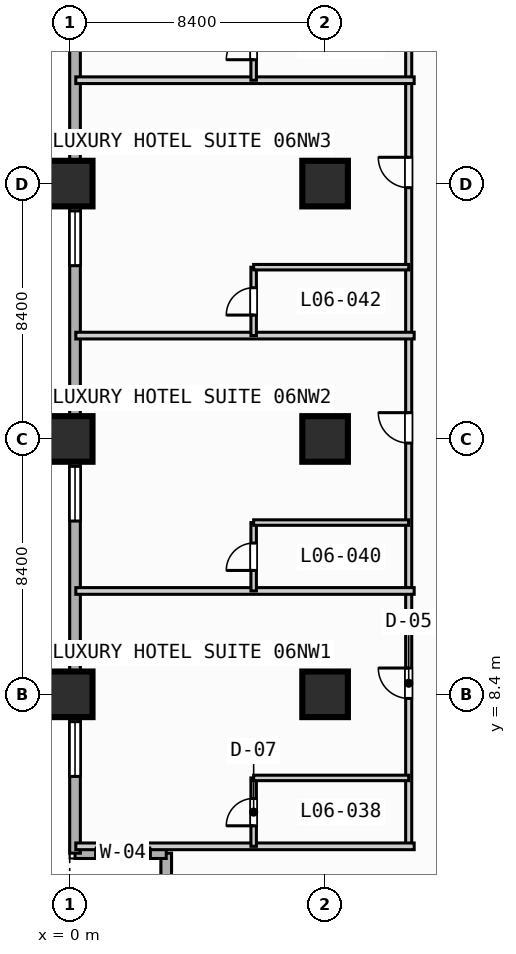
"""IFC4 building model, lengths in metres.
Left out: names, types, materials, properties, quantities, classifications, styles, units other than length and angle.
Written with IfcOpenShell. Run it as: python <this file> out.ifc"""

import sys

from ifc_helpers import new_model, si_unit, direction, frame, frame_2d, origin, origin_2d, place, context, subcontext, project, spatial, rectangle, extrude, element, fill, save


model = new_model("IFC4")
c1 = context("Model", 3, precision=1e-05, world=origin(), true_north=direction((0.0, 1.0)))
c2 = subcontext(c1, "Body", "Model", "MODEL_VIEW")
j1 = project(units=[si_unit("LENGTHUNIT", "METRE"), si_unit("PLANEANGLEUNIT", "RADIAN")], contexts=[c1])
p1 = place(None, origin())
s1 = spatial("IfcSite", under=j1, at=p1, CompositionType="ELEMENT")
p2 = place(p1, origin())
s2 = spatial("IfcBuilding", under=s1, at=p2, CompositionType="ELEMENT")
p3 = place(p2, frame((0.0, 0.0, 32.0)))
s3 = spatial("IfcBuildingStorey", under=s2, at=p3, CompositionType="ELEMENT", Elevation=32.0)
for number, where, z_axis, x_axis in (
    (1, (0.0, 8.4, 0.0), (0.0, 0.0, 1.0), (1.0, 0.0, 0.0)),
    (2, (0.0, 16.8, 0.0), (0.0, 0.0, 1.0), (1.0, 0.0, 0.0)),
    (3, (0.0, 25.2, 0.0), (0.0, 0.0, 1.0), (1.0, 0.0, 0.0)),
    (4, (8.4, 8.4, 0.0), (0.0, 0.0, 1.0), (1.0, 0.0, 0.0)),
    (5, (8.4, 16.8, 0.0), (0.0, 0.0, 1.0), (1.0, 0.0, 0.0)),
    (6, (8.4, 25.2, 0.0), (0.0, 0.0, 1.0), (1.0, 0.0, 0.0)),
):
    element("IfcColumn", number, at=place(p3, frame(where, z_axis=z_axis, x_axis=x_axis)), inside=s3, PredefinedType="COLUMN", context=c2, shape_type="SweptSolid", body=[
        extrude(rectangle(XDim=1.5, YDim=1.5, at=origin_2d()), origin(), (0.0, 0.0, 1.0), 3.8),
    ])
p4 = place(p3, frame((3.175, 0.175, 0.0), z_axis=(0.0, 0.0, 1.0), x_axis=(0.0, 1.0, 0.0)))
e7 = element("IfcWall", 7, at=p4, inside=s3, PredefinedType="STANDARD", context=c2, shape_type="SweptSolid", body=[
    extrude(rectangle(XDim=3.0, YDim=0.35, at=frame_2d((1.5, 0.0))), origin(), (0.0, 0.0, 1.0), 3.55),
])
p5 = place(p3, frame((3.175, 3.175, 0.0), z_axis=(0.0, 0.0, 1.0), x_axis=(-1.0, 0.0, 0.0)))
e8 = element("IfcWall", 8, at=p5, inside=s3, PredefinedType="STANDARD", context=c2, shape_type="SweptSolid", body=[
    extrude(rectangle(XDim=3.0, YDim=0.35, at=frame_2d((1.5, 0.0))), origin(), (0.0, 0.0, 1.0), 3.55),
])
p6 = place(p5, frame((0.522, 0.0, 0.85)))
e9 = element("IfcOpeningElement", 9, at=p6, cuts=e8, PredefinedType="OPENING", context=c2, shape_type="SweptSolid", body=[
    extrude(rectangle(XDim=1.8, YDim=1.8, at=frame_2d((0.9, 0.9))), frame((0.0, 0.185, 0.0), z_axis=(0.0, -1.0, 0.0), x_axis=(1.0, 0.0, 0.0)), (0.0, 0.0, 1.0), 0.37),
])
p7 = place(p3, frame((0.175, 3.175, 0.0), z_axis=(0.0, 0.0, 1.0), x_axis=(0.0, 1.0, 0.0)))
e10 = element("IfcWall", 10, at=p7, inside=s3, PredefinedType="STANDARD", context=c2, shape_type="SweptSolid", body=[
    extrude(rectangle(XDim=86.05, YDim=0.35, at=frame_2d((43.025, 0.0))), origin(), (0.0, 0.0, 1.0), 3.55),
])
p8 = place(p7, frame((42.825, 0.0, 0.0)))
e11 = element("IfcOpeningElement", 11, at=p8, cuts=e10, PredefinedType="OPENING", context=c2, shape_type="SweptSolid", body=[
    extrude(rectangle(XDim=1.4, YDim=2.2, at=frame_2d((0.7, 1.1))), frame((0.0, 0.185, 0.0), z_axis=(0.0, -1.0, 0.0), x_axis=(1.0, 0.0, 0.0)), (0.0, 0.0, 1.0), 0.37),
])
p9 = place(p7, frame((2.525, 0.0, 0.85)))
e12 = element("IfcOpeningElement", 12, at=p9, cuts=e10, PredefinedType="OPENING", context=c2, shape_type="SweptSolid", body=[
    extrude(rectangle(XDim=1.8, YDim=1.8, at=frame_2d((0.9, 0.9))), frame((0.0, 0.185, 0.0), z_axis=(0.0, -1.0, 0.0), x_axis=(1.0, 0.0, 0.0)), (0.0, 0.0, 1.0), 0.37),
])
p10 = place(p7, frame((10.925, 0.0, 0.85)))
e13 = element("IfcOpeningElement", 13, at=p10, cuts=e10, PredefinedType="OPENING", context=c2, shape_type="SweptSolid", body=[
    extrude(rectangle(XDim=1.8, YDim=1.8, at=frame_2d((0.9, 0.9))), frame((0.0, 0.185, 0.0), z_axis=(0.0, -1.0, 0.0), x_axis=(1.0, 0.0, 0.0)), (0.0, 0.0, 1.0), 0.37),
])
p11 = place(p7, frame((19.325, 0.0, 0.85)))
e14 = element("IfcOpeningElement", 14, at=p11, cuts=e10, PredefinedType="OPENING", context=c2, shape_type="SweptSolid", body=[
    extrude(rectangle(XDim=1.8, YDim=1.8, at=frame_2d((0.9, 0.9))), frame((0.0, 0.185, 0.0), z_axis=(0.0, -1.0, 0.0), x_axis=(1.0, 0.0, 0.0)), (0.0, 0.0, 1.0), 0.37),
])
p12 = place(p7, frame((27.725, 0.0, 0.85)))
e15 = element("IfcOpeningElement", 15, at=p12, cuts=e10, PredefinedType="OPENING", context=c2, shape_type="SweptSolid", body=[
    extrude(rectangle(XDim=1.8, YDim=1.8, at=frame_2d((0.9, 0.9))), frame((0.0, 0.185, 0.0), z_axis=(0.0, -1.0, 0.0), x_axis=(1.0, 0.0, 0.0)), (0.0, 0.0, 1.0), 0.37),
])
p13 = place(p7, frame((36.125, 0.0, 0.85)))
e16 = element("IfcOpeningElement", 16, at=p13, cuts=e10, PredefinedType="OPENING", context=c2, shape_type="SweptSolid", body=[
    extrude(rectangle(XDim=1.8, YDim=1.8, at=frame_2d((0.9, 0.9))), frame((0.0, 0.185, 0.0), z_axis=(0.0, -1.0, 0.0), x_axis=(1.0, 0.0, 0.0)), (0.0, 0.0, 1.0), 0.37),
])
p14 = place(p7, frame((52.925, 0.0, 0.85)))
e17 = element("IfcOpeningElement", 17, at=p14, cuts=e10, PredefinedType="OPENING", context=c2, shape_type="SweptSolid", body=[
    extrude(rectangle(XDim=1.8, YDim=1.8, at=frame_2d((0.9, 0.9))), frame((0.0, 0.185, 0.0), z_axis=(0.0, -1.0, 0.0), x_axis=(1.0, 0.0, 0.0)), (0.0, 0.0, 1.0), 0.37),
])
p15 = place(p7, frame((61.325, 0.0, 0.85)))
e18 = element("IfcOpeningElement", 18, at=p15, cuts=e10, PredefinedType="OPENING", context=c2, shape_type="SweptSolid", body=[
    extrude(rectangle(XDim=1.8, YDim=1.8, at=frame_2d((0.9, 0.9))), frame((0.0, 0.185, 0.0), z_axis=(0.0, -1.0, 0.0), x_axis=(1.0, 0.0, 0.0)), (0.0, 0.0, 1.0), 0.37),
])
p16 = place(p7, frame((69.725, 0.0, 0.85)))
e19 = element("IfcOpeningElement", 19, at=p16, cuts=e10, PredefinedType="OPENING", context=c2, shape_type="SweptSolid", body=[
    extrude(rectangle(XDim=1.8, YDim=1.8, at=frame_2d((0.9, 0.9))), frame((0.0, 0.185, 0.0), z_axis=(0.0, -1.0, 0.0), x_axis=(1.0, 0.0, 0.0)), (0.0, 0.0, 1.0), 0.37),
])
p17 = place(p7, frame((78.075, 0.0, 0.85)))
e20 = element("IfcOpeningElement", 20, at=p17, cuts=e10, PredefinedType="OPENING", context=c2, shape_type="SweptSolid", body=[
    extrude(rectangle(XDim=1.8, YDim=1.8, at=frame_2d((0.9, 0.9))), frame((0.0, 0.185, 0.0), z_axis=(0.0, -1.0, 0.0), x_axis=(1.0, 0.0, 0.0)), (0.0, 0.0, 1.0), 0.37),
])
p18 = place(p3, frame((11.15, 3.4, 0.0), z_axis=(0.0, 0.0, 1.0), x_axis=(0.0, 1.0, 0.0)))
e21 = element("IfcWall", 21, at=p18, inside=s3, PredefinedType="PARTITIONING", context=c2, shape_type="SweptSolid", body=[
    extrude(rectangle(XDim=85.4, YDim=0.2, at=frame_2d((42.7, 0.0))), origin(), (0.0, 0.0, 1.0), 3.55),
])
p19 = place(p18, frame((4.865, 0.0, 0.0)))
e22 = element("IfcOpeningElement", 22, at=p19, cuts=e21, PredefinedType="OPENING", context=c2, shape_type="SweptSolid", body=[
    extrude(rectangle(XDim=1.0, YDim=2.15, at=frame_2d((0.5, 1.075))), frame((0.0, 0.11, 0.0), z_axis=(0.0, -1.0, 0.0), x_axis=(1.0, 0.0, 0.0)), (0.0, 0.0, 1.0), 0.22),
])
p20 = place(p18, frame((13.265, 0.0, 0.0)))
e23 = element("IfcOpeningElement", 23, at=p20, cuts=e21, PredefinedType="OPENING", context=c2, shape_type="SweptSolid", body=[
    extrude(rectangle(XDim=1.0, YDim=2.15, at=frame_2d((0.5, 1.075))), frame((0.0, 0.11, 0.0), z_axis=(0.0, -1.0, 0.0), x_axis=(1.0, 0.0, 0.0)), (0.0, 0.0, 1.0), 0.22),
])
p21 = place(p18, frame((21.665, 0.0, 0.0)))
e24 = element("IfcOpeningElement", 24, at=p21, cuts=e21, PredefinedType="OPENING", context=c2, shape_type="SweptSolid", body=[
    extrude(rectangle(XDim=1.0, YDim=2.15, at=frame_2d((0.5, 1.075))), frame((0.0, 0.11, 0.0), z_axis=(0.0, -1.0, 0.0), x_axis=(1.0, 0.0, 0.0)), (0.0, 0.0, 1.0), 0.22),
])
p22 = place(p18, frame((30.065, 0.0, 0.0)))
e25 = element("IfcOpeningElement", 25, at=p22, cuts=e21, PredefinedType="OPENING", context=c2, shape_type="SweptSolid", body=[
    extrude(rectangle(XDim=1.0, YDim=2.15, at=frame_2d((0.5, 1.075))), frame((0.0, 0.11, 0.0), z_axis=(0.0, -1.0, 0.0), x_axis=(1.0, 0.0, 0.0)), (0.0, 0.0, 1.0), 0.22),
])
p23 = place(p18, frame((38.465, 0.0, 0.0)))
e26 = element("IfcOpeningElement", 26, at=p23, cuts=e21, PredefinedType="OPENING", context=c2, shape_type="SweptSolid", body=[
    extrude(rectangle(XDim=1.0, YDim=2.15, at=frame_2d((0.5, 1.075))), frame((0.0, 0.11, 0.0), z_axis=(0.0, -1.0, 0.0), x_axis=(1.0, 0.0, 0.0)), (0.0, 0.0, 1.0), 0.22),
])
p24 = place(p18, frame((46.865, 0.0, 0.0)))
e27 = element("IfcOpeningElement", 27, at=p24, cuts=e21, PredefinedType="OPENING", context=c2, shape_type="SweptSolid", body=[
    extrude(rectangle(XDim=1.0, YDim=2.15, at=frame_2d((0.5, 1.075))), frame((0.0, 0.11, 0.0), z_axis=(0.0, -1.0, 0.0), x_axis=(1.0, 0.0, 0.0)), (0.0, 0.0, 1.0), 0.22),
])
p25 = place(p18, frame((55.265, 0.0, 0.0)))
e28 = element("IfcOpeningElement", 28, at=p25, cuts=e21, PredefinedType="OPENING", context=c2, shape_type="SweptSolid", body=[
    extrude(rectangle(XDim=1.0, YDim=2.15, at=frame_2d((0.5, 1.075))), frame((0.0, 0.11, 0.0), z_axis=(0.0, -1.0, 0.0), x_axis=(1.0, 0.0, 0.0)), (0.0, 0.0, 1.0), 0.22),
])
p26 = place(p18, frame((63.665, 0.0, 0.0)))
e29 = element("IfcOpeningElement", 29, at=p26, cuts=e21, PredefinedType="OPENING", context=c2, shape_type="SweptSolid", body=[
    extrude(rectangle(XDim=1.0, YDim=2.15, at=frame_2d((0.5, 1.075))), frame((0.0, 0.11, 0.0), z_axis=(0.0, -1.0, 0.0), x_axis=(1.0, 0.0, 0.0)), (0.0, 0.0, 1.0), 0.22),
])
p27 = place(p18, frame((72.065, 0.0, 0.0)))
e30 = element("IfcOpeningElement", 30, at=p27, cuts=e21, PredefinedType="OPENING", context=c2, shape_type="SweptSolid", body=[
    extrude(rectangle(XDim=1.0, YDim=2.15, at=frame_2d((0.5, 1.075))), frame((0.0, 0.11, 0.0), z_axis=(0.0, -1.0, 0.0), x_axis=(1.0, 0.0, 0.0)), (0.0, 0.0, 1.0), 0.22),
])
p28 = place(p18, frame((81.165, 0.0, 0.0)))
e31 = element("IfcOpeningElement", 31, at=p28, cuts=e21, PredefinedType="OPENING", context=c2, shape_type="SweptSolid", body=[
    extrude(rectangle(XDim=1.0, YDim=2.15, at=frame_2d((0.5, 1.075))), frame((0.0, 0.11, 0.0), z_axis=(0.0, -1.0, 0.0), x_axis=(1.0, 0.0, 0.0)), (0.0, 0.0, 1.0), 0.22),
])
p29 = place(p3, frame((0.2, 3.4, 0.0), z_axis=(0.0, 0.0, 1.0), x_axis=(1.0, 0.0, 0.0)))
e32 = element("IfcWall", 32, at=p29, inside=s3, PredefinedType="PARTITIONING", context=c2, shape_type="SweptSolid", body=[
    extrude(rectangle(XDim=11.13, YDim=0.22, at=frame_2d((5.565, 0.0))), origin(), (0.0, 0.0, 1.0), 3.55),
])
p30 = place(p3, frame((6.05, 3.4, 0.0), z_axis=(0.0, 0.0, 1.0), x_axis=(0.0, 1.0, 0.0)))
e33 = element("IfcWall", 33, at=p30, inside=s3, PredefinedType="PLUMBINGWALL", context=c2, shape_type="SweptSolid", body=[
    extrude(rectangle(XDim=2.25, YDim=0.18, at=frame_2d((1.125, 0.0))), origin(), (0.0, 0.0, 1.0), 3.55),
])
p31 = place(p30, frame((0.675, 0.0, 0.0)))
e34 = element("IfcOpeningElement", 34, at=p31, cuts=e33, PredefinedType="OPENING", context=c2, shape_type="SweptSolid", body=[
    extrude(rectangle(XDim=0.9, YDim=2.1, at=frame_2d((0.45, 1.05))), frame((0.0, 0.1, 0.0), z_axis=(0.0, -1.0, 0.0), x_axis=(1.0, 0.0, 0.0)), (0.0, 0.0, 1.0), 0.2),
])
p32 = place(p3, frame((6.05, 5.65, 0.0), z_axis=(0.0, 0.0, 1.0), x_axis=(1.0, 0.0, 0.0)))
e35 = element("IfcWall", 35, at=p32, inside=s3, PredefinedType="PLUMBINGWALL", context=c2, shape_type="SweptSolid", body=[
    extrude(rectangle(XDim=5.1, YDim=0.18, at=frame_2d((2.55, 0.0))), origin(), (0.0, 0.0, 1.0), 3.55),
])
p33 = place(p3, frame((0.2, 11.8, 0.0), z_axis=(0.0, 0.0, 1.0), x_axis=(1.0, 0.0, 0.0)))
e36 = element("IfcWall", 36, at=p33, inside=s3, PredefinedType="PARTITIONING", context=c2, shape_type="SweptSolid", body=[
    extrude(rectangle(XDim=11.13, YDim=0.22, at=frame_2d((5.565, 0.0))), origin(), (0.0, 0.0, 1.0), 3.55),
])
p34 = place(p3, frame((6.05, 11.8, 0.0), z_axis=(0.0, 0.0, 1.0), x_axis=(0.0, 1.0, 0.0)))
e37 = element("IfcWall", 37, at=p34, inside=s3, PredefinedType="PLUMBINGWALL", context=c2, shape_type="SweptSolid", body=[
    extrude(rectangle(XDim=2.25, YDim=0.18, at=frame_2d((1.125, 0.0))), origin(), (0.0, 0.0, 1.0), 3.55),
])
p35 = place(p34, frame((0.675, 0.0, 0.0)))
e38 = element("IfcOpeningElement", 38, at=p35, cuts=e37, PredefinedType="OPENING", context=c2, shape_type="SweptSolid", body=[
    extrude(rectangle(XDim=0.9, YDim=2.1, at=frame_2d((0.45, 1.05))), frame((0.0, 0.1, 0.0), z_axis=(0.0, -1.0, 0.0), x_axis=(1.0, 0.0, 0.0)), (0.0, 0.0, 1.0), 0.2),
])
p36 = place(p3, frame((6.05, 14.05, 0.0), z_axis=(0.0, 0.0, 1.0), x_axis=(1.0, 0.0, 0.0)))
e39 = element("IfcWall", 39, at=p36, inside=s3, PredefinedType="PLUMBINGWALL", context=c2, shape_type="SweptSolid", body=[
    extrude(rectangle(XDim=5.1, YDim=0.18, at=frame_2d((2.55, 0.0))), origin(), (0.0, 0.0, 1.0), 3.55),
])
p37 = place(p3, frame((0.2, 20.2, 0.0), z_axis=(0.0, 0.0, 1.0), x_axis=(1.0, 0.0, 0.0)))
e40 = element("IfcWall", 40, at=p37, inside=s3, PredefinedType="PARTITIONING", context=c2, shape_type="SweptSolid", body=[
    extrude(rectangle(XDim=11.13, YDim=0.22, at=frame_2d((5.565, 0.0))), origin(), (0.0, 0.0, 1.0), 3.55),
])
p38 = place(p3, frame((6.05, 20.2, 0.0), z_axis=(0.0, 0.0, 1.0), x_axis=(0.0, 1.0, 0.0)))
e41 = element("IfcWall", 41, at=p38, inside=s3, PredefinedType="PLUMBINGWALL", context=c2, shape_type="SweptSolid", body=[
    extrude(rectangle(XDim=2.25, YDim=0.18, at=frame_2d((1.125, 0.0))), origin(), (0.0, 0.0, 1.0), 3.55),
])
p39 = place(p38, frame((0.675, 0.0, 0.0)))
e42 = element("IfcOpeningElement", 42, at=p39, cuts=e41, PredefinedType="OPENING", context=c2, shape_type="SweptSolid", body=[
    extrude(rectangle(XDim=0.9, YDim=2.1, at=frame_2d((0.45, 1.05))), frame((0.0, 0.1, 0.0), z_axis=(0.0, -1.0, 0.0), x_axis=(1.0, 0.0, 0.0)), (0.0, 0.0, 1.0), 0.2),
])
p40 = place(p3, frame((6.05, 22.45, 0.0), z_axis=(0.0, 0.0, 1.0), x_axis=(1.0, 0.0, 0.0)))
e43 = element("IfcWall", 43, at=p40, inside=s3, PredefinedType="PLUMBINGWALL", context=c2, shape_type="SweptSolid", body=[
    extrude(rectangle(XDim=5.1, YDim=0.18, at=frame_2d((2.55, 0.0))), origin(), (0.0, 0.0, 1.0), 3.55),
])
p41 = place(p3, frame((0.2, 28.6, 0.0), z_axis=(0.0, 0.0, 1.0), x_axis=(1.0, 0.0, 0.0)))
e44 = element("IfcWall", 44, at=p41, inside=s3, PredefinedType="PARTITIONING", context=c2, shape_type="SweptSolid", body=[
    extrude(rectangle(XDim=11.13, YDim=0.22, at=frame_2d((5.565, 0.0))), origin(), (0.0, 0.0, 1.0), 3.55),
])
p42 = place(p3, frame((6.05, 28.6, 0.0), z_axis=(0.0, 0.0, 1.0), x_axis=(0.0, 1.0, 0.0)))
e45 = element("IfcWall", 45, at=p42, inside=s3, PredefinedType="PLUMBINGWALL", context=c2, shape_type="SweptSolid", body=[
    extrude(rectangle(XDim=2.25, YDim=0.18, at=frame_2d((1.125, 0.0))), origin(), (0.0, 0.0, 1.0), 3.55),
])
p43 = place(p42, frame((0.675, 0.0, 0.0)))
e46 = element("IfcOpeningElement", 46, at=p43, cuts=e45, PredefinedType="OPENING", context=c2, shape_type="SweptSolid", body=[
    extrude(rectangle(XDim=0.9, YDim=2.1, at=frame_2d((0.45, 1.05))), frame((0.0, 0.1, 0.0), z_axis=(0.0, -1.0, 0.0), x_axis=(1.0, 0.0, 0.0)), (0.0, 0.0, 1.0), 0.2),
])
p44 = place(p6, origin())
e47 = element("IfcWindow", 47, at=p44, inside=s3, PartitioningType="SINGLE_PANEL", PredefinedType="WINDOW", context=c2, shape_type="SweptSolid", body=[
    extrude(rectangle(XDim=1.8, YDim=1.8, at=frame_2d((0.9, 0.9))), frame((0.0, 0.03, 0.0), z_axis=(0.0, -1.0, 0.0), x_axis=(1.0, 0.0, 0.0)), (0.0, 0.0, 1.0), 0.06),
])
fill(e9, e47)
p45 = place(p9, origin())
e48 = element("IfcWindow", 48, at=p45, inside=s3, PartitioningType="SINGLE_PANEL", PredefinedType="WINDOW", context=c2, shape_type="SweptSolid", body=[
    extrude(rectangle(XDim=1.8, YDim=1.8, at=frame_2d((0.9, 0.9))), frame((0.0, 0.03, 0.0), z_axis=(0.0, -1.0, 0.0), x_axis=(1.0, 0.0, 0.0)), (0.0, 0.0, 1.0), 0.06),
])
fill(e12, e48)
p46 = place(p10, origin())
e49 = element("IfcWindow", 49, at=p46, inside=s3, PartitioningType="SINGLE_PANEL", PredefinedType="WINDOW", context=c2, shape_type="SweptSolid", body=[
    extrude(rectangle(XDim=1.8, YDim=1.8, at=frame_2d((0.9, 0.9))), frame((0.0, 0.03, 0.0), z_axis=(0.0, -1.0, 0.0), x_axis=(1.0, 0.0, 0.0)), (0.0, 0.0, 1.0), 0.06),
])
fill(e13, e49)
p47 = place(p11, origin())
e50 = element("IfcWindow", 50, at=p47, inside=s3, PartitioningType="SINGLE_PANEL", PredefinedType="WINDOW", context=c2, shape_type="SweptSolid", body=[
    extrude(rectangle(XDim=1.8, YDim=1.8, at=frame_2d((0.9, 0.9))), frame((0.0, 0.03, 0.0), z_axis=(0.0, -1.0, 0.0), x_axis=(1.0, 0.0, 0.0)), (0.0, 0.0, 1.0), 0.06),
])
fill(e14, e50)
p48 = place(p19, origin())
e51 = element("IfcDoor", 51, at=p48, inside=s3, OperationType="SINGLE_SWING_RIGHT", PredefinedType="DOOR", context=c2, shape_type="SweptSolid", body=[
    extrude(rectangle(XDim=1.0, YDim=2.15, at=frame_2d((0.5, 1.075))), frame((0.0, 0.025, 0.0), z_axis=(0.0, -1.0, 0.0), x_axis=(1.0, 0.0, 0.0)), (0.0, 0.0, 1.0), 0.05),
])
fill(e22, e51)
p49 = place(p20, origin())
e52 = element("IfcDoor", 52, at=p49, inside=s3, OperationType="SINGLE_SWING_RIGHT", PredefinedType="DOOR", context=c2, shape_type="SweptSolid", body=[
    extrude(rectangle(XDim=1.0, YDim=2.15, at=frame_2d((0.5, 1.075))), frame((0.0, 0.025, 0.0), z_axis=(0.0, -1.0, 0.0), x_axis=(1.0, 0.0, 0.0)), (0.0, 0.0, 1.0), 0.05),
])
fill(e23, e52)
p50 = place(p21, origin())
e53 = element("IfcDoor", 53, at=p50, inside=s3, OperationType="SINGLE_SWING_RIGHT", PredefinedType="DOOR", context=c2, shape_type="SweptSolid", body=[
    extrude(rectangle(XDim=1.0, YDim=2.15, at=frame_2d((0.5, 1.075))), frame((0.0, 0.025, 0.0), z_axis=(0.0, -1.0, 0.0), x_axis=(1.0, 0.0, 0.0)), (0.0, 0.0, 1.0), 0.05),
])
fill(e24, e53)
p51 = place(p31, origin())
e54 = element("IfcDoor", 54, at=p51, inside=s3, OperationType="SINGLE_SWING_LEFT", PredefinedType="DOOR", context=c2, shape_type="SweptSolid", body=[
    extrude(rectangle(XDim=0.9, YDim=2.1, at=frame_2d((0.45, 1.05))), frame((0.0, 0.025, 0.0), z_axis=(0.0, -1.0, 0.0), x_axis=(1.0, 0.0, 0.0)), (0.0, 0.0, 1.0), 0.05),
])
fill(e34, e54)
p52 = place(p35, origin())
e55 = element("IfcDoor", 55, at=p52, inside=s3, OperationType="SINGLE_SWING_LEFT", PredefinedType="DOOR", context=c2, shape_type="SweptSolid", body=[
    extrude(rectangle(XDim=0.9, YDim=2.1, at=frame_2d((0.45, 1.05))), frame((0.0, 0.025, 0.0), z_axis=(0.0, -1.0, 0.0), x_axis=(1.0, 0.0, 0.0)), (0.0, 0.0, 1.0), 0.05),
])
fill(e38, e55)
p53 = place(p39, origin())
e56 = element("IfcDoor", 56, at=p53, inside=s3, OperationType="SINGLE_SWING_LEFT", PredefinedType="DOOR", context=c2, shape_type="SweptSolid", body=[
    extrude(rectangle(XDim=0.9, YDim=2.1, at=frame_2d((0.45, 1.05))), frame((0.0, 0.025, 0.0), z_axis=(0.0, -1.0, 0.0), x_axis=(1.0, 0.0, 0.0)), (0.0, 0.0, 1.0), 0.05),
])
fill(e42, e56)
p54 = place(p43, origin())
e57 = element("IfcDoor", 57, at=p54, inside=s3, OperationType="SINGLE_SWING_LEFT", PredefinedType="DOOR", context=c2, shape_type="SweptSolid", body=[
    extrude(rectangle(XDim=0.9, YDim=2.1, at=frame_2d((0.45, 1.05))), frame((0.0, 0.025, 0.0), z_axis=(0.0, -1.0, 0.0), x_axis=(1.0, 0.0, 0.0)), (0.0, 0.0, 1.0), 0.05),
])
fill(e46, e57)
save(model, sys.argv[1])
